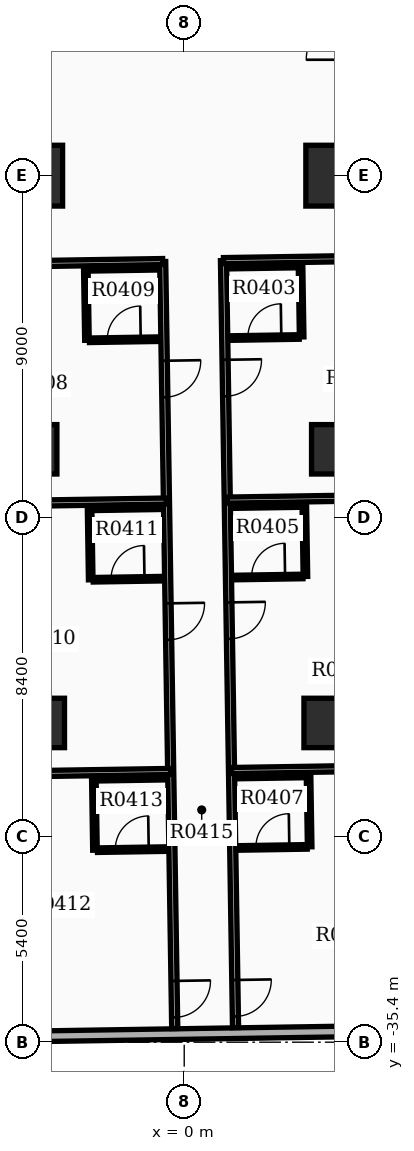
"""IFC4 building model, lengths in metres.
Left out: names, types, materials, properties, quantities, classifications, styles, units other than length and angle.
Written with IfcOpenShell. Run it as: python <this file> out.ifc"""

import sys

from ifc_helpers import new_model, si_unit, direction, frame, frame_2d, origin, origin_2d, place, context, subcontext, project, spatial, rectangle, extrude, element, fill, save


model = new_model("IFC4")
c1 = context("Model", 3, precision=1e-05, world=origin(), true_north=direction((0.0, 1.0)))
c2 = subcontext(c1, "Body", "Model", "MODEL_VIEW")
j1 = project(units=[si_unit("LENGTHUNIT", "METRE"), si_unit("PLANEANGLEUNIT", "RADIAN")], contexts=[c1])
p1 = place(None, origin())
s1 = spatial("IfcSite", under=j1, at=p1, CompositionType="ELEMENT")
p2 = place(p1, origin())
s2 = spatial("IfcBuilding", under=s1, at=p2, CompositionType="ELEMENT")
p3 = place(p2, frame((0.0, 0.0, 27.6)))
s3 = spatial("IfcBuildingStorey", under=s2, at=p3, CompositionType="ELEMENT", Elevation=27.6)
for number, where, z_axis, x_axis in (
    (1, (-4.0, -12.6, 0.0), (0.0, 0.0, 1.0), (1.0, 0.0, 0.0)),
    (2, (4.0, -12.6, 0.0), (0.0, 0.0, 1.0), (1.0, 0.0, 0.0)),
):
    element("IfcColumn", number, at=place(p3, frame(where, z_axis=z_axis, x_axis=x_axis)), inside=s3, PredefinedType="COLUMN", context=c2, shape_type="SweptSolid", body=[
        extrude(rectangle(XDim=1.6, YDim=1.6, at=origin_2d()), origin(), (0.0, 0.0, 1.0), 3.9),
    ])
for number, where, z_axis, x_axis in (
    (3, (-4.0, -19.8, 0.0), (0.0, 0.0, 1.0), (1.0, 0.0, 0.0)),
    (4, (4.0, -19.8, 0.0), (0.0, 0.0, 1.0), (1.0, 0.0, 0.0)),
    (5, (-3.8, -27.0, 0.0), (0.0, 0.0, 1.0), (1.0, 0.0, 0.0)),
    (6, (3.8, -27.0, 0.0), (0.0, 0.0, 1.0), (1.0, 0.0, 0.0)),
):
    element("IfcColumn", number, at=place(p3, frame(where, z_axis=z_axis, x_axis=x_axis)), inside=s3, PredefinedType="COLUMN", context=c2, shape_type="SweptSolid", body=[
        extrude(rectangle(XDim=1.3, YDim=1.3, at=origin_2d()), origin(), (0.0, 0.0, 1.0), 3.9),
    ])
p4 = place(p3, frame((-6.307, -35.283, 0.0), z_axis=(0.0, 0.0, 1.0), x_axis=(0.999876549481, 0.015712599986, 0.0)))
e7 = element("IfcWall", 7, at=p4, inside=s3, PredefinedType="STANDARD", context=c2, shape_type="SweptSolid", body=[
    extrude(rectangle(XDim=13.72, YDim=0.28, at=frame_2d((6.86, 0.0))), origin(), (0.0, 0.0, 1.0), 2.91),
])
p5 = place(p4, frame((0.85, 0.0, 0.85)))
e8 = element("IfcOpeningElement", 8, at=p5, cuts=e7, PredefinedType="OPENING", context=c2, shape_type="SweptSolid", body=[
    extrude(rectangle(XDim=1.0, YDim=1.5, at=frame_2d((0.5, 0.75))), frame((0.0, 0.15, 0.0), z_axis=(0.0, -1.0, 0.0), x_axis=(1.0, 0.0, 0.0)), (0.0, 0.0, 1.0), 0.3),
])
p6 = place(p3, frame((1.033, -14.836, 0.0), z_axis=(0.0, 0.0, 1.0), x_axis=(0.015701893165, -0.999876717676, 0.0)))
e9 = element("IfcWall", 9, at=p6, inside=s3, PredefinedType="PARTITIONING", context=c2, shape_type="SweptSolid", body=[
    extrude(rectangle(XDim=20.182, YDim=0.16, at=frame_2d((10.091, 0.0))), origin(), (0.0, 0.0, 1.0), 2.9),
])
p7 = place(p6, frame((2.61, 0.0, 0.0)))
e10 = element("IfcOpeningElement", 10, at=p7, cuts=e9, PredefinedType="OPENING", context=c2, shape_type="SweptSolid", body=[
    extrude(rectangle(XDim=0.96, YDim=2.15, at=frame_2d((0.48, 1.075))), frame((0.0, 0.09, 0.0), z_axis=(0.0, -1.0, 0.0), x_axis=(1.0, 0.0, 0.0)), (0.0, 0.0, 1.0), 0.18),
])
p8 = place(p6, frame((8.994, 0.0, 0.0)))
e11 = element("IfcOpeningElement", 11, at=p8, cuts=e9, PredefinedType="OPENING", context=c2, shape_type="SweptSolid", body=[
    extrude(rectangle(XDim=0.96, YDim=2.15, at=frame_2d((0.48, 1.075))), frame((0.0, 0.09, 0.0), z_axis=(0.0, -1.0, 0.0), x_axis=(1.0, 0.0, 0.0)), (0.0, 0.0, 1.0), 0.18),
])
p9 = place(p6, frame((18.93, 0.0, 0.0)))
e12 = element("IfcOpeningElement", 12, at=p9, cuts=e9, PredefinedType="OPENING", context=c2, shape_type="SweptSolid", body=[
    extrude(rectangle(XDim=0.96, YDim=2.15, at=frame_2d((0.48, 1.075))), frame((0.0, 0.09, 0.0), z_axis=(0.0, -1.0, 0.0), x_axis=(1.0, 0.0, 0.0)), (0.0, 0.0, 1.0), 0.18),
])
p10 = place(p3, frame((1.033, -14.836, 0.0), z_axis=(0.0, 0.0, 1.0), x_axis=(0.999876548847, 0.015712640343, 0.0)))
e13 = element("IfcWall", 13, at=p10, inside=s3, PredefinedType="PARTITIONING", context=c2, shape_type="SweptSolid", body=[
    extrude(rectangle(XDim=5.92, YDim=0.16, at=frame_2d((2.96, 0.0))), origin(), (0.0, 0.0, 1.0), 2.9),
])
p11 = place(p3, frame((1.132, -21.137, 0.0), z_axis=(0.0, 0.0, 1.0), x_axis=(0.999876865599, 0.015692470796, 0.0)))
e14 = element("IfcWall", 14, at=p11, inside=s3, PredefinedType="PARTITIONING", context=c2, shape_type="SweptSolid", body=[
    extrude(rectangle(XDim=5.772, YDim=0.16, at=frame_2d((2.886, 0.0))), origin(), (0.0, 0.0, 1.0), 2.9),
])
p12 = place(p3, frame((1.205, -16.873, 0.0), z_axis=(0.0, 0.0, 1.0), x_axis=(0.999874722342, 0.015828443418, 0.0)))
e15 = element("IfcWall", 15, at=p12, inside=s3, PredefinedType="PARTITIONING", context=c2, shape_type="SweptSolid", body=[
    extrude(rectangle(XDim=1.82, YDim=0.12, at=frame_2d((0.91, 0.0))), origin(), (0.0, 0.0, 1.0), 2.9),
])
p13 = place(p12, frame((0.47, 0.0, 0.0)))
e16 = element("IfcOpeningElement", 16, at=p13, cuts=e15, PredefinedType="OPENING", context=c2, shape_type="SweptSolid", body=[
    extrude(rectangle(XDim=0.88, YDim=2.1, at=frame_2d((0.44, 1.05))), frame((0.0, 0.07, 0.0), z_axis=(0.0, -1.0, 0.0), x_axis=(1.0, 0.0, 0.0)), (0.0, 0.0, 1.0), 0.14),
])
p14 = place(p3, frame((1.176, -14.993, 0.0), z_axis=(0.0, 0.0, 1.0), x_axis=(0.999876803258, 0.015696442504, 0.0)))
e17 = element("IfcWall", 17, at=p14, inside=s3, PredefinedType="PARTITIONING", context=c2, shape_type="SweptSolid", body=[
    extrude(rectangle(XDim=1.82, YDim=0.12, at=frame_2d((0.91, 0.0))), origin(), (0.0, 0.0, 1.0), 2.9),
])
p15 = place(p3, frame((3.06, -14.964, 0.0), z_axis=(0.0, 0.0, 1.0), x_axis=(0.015714386166, -0.99987652141, 0.0)))
e18 = element("IfcWall", 18, at=p15, inside=s3, PredefinedType="PARTITIONING", context=c2, shape_type="SweptSolid", body=[
    extrude(rectangle(XDim=1.88, YDim=0.12, at=frame_2d((0.94, 0.0))), origin(), (0.0, 0.0, 1.0), 2.9),
])
p16 = place(p3, frame((1.244, -28.252, 0.0), z_axis=(0.0, 0.0, 1.0), x_axis=(0.999876865599, 0.015692470796, 0.0)))
e19 = element("IfcWall", 19, at=p16, inside=s3, PredefinedType="PARTITIONING", context=c2, shape_type="SweptSolid", body=[
    extrude(rectangle(XDim=5.772, YDim=0.16, at=frame_2d((2.886, 0.0))), origin(), (0.0, 0.0, 1.0), 2.9),
])
p17 = place(p3, frame((1.304, -23.174, 0.0), z_axis=(0.0, 0.0, 1.0), x_axis=(0.999876803258, 0.015696442504, 0.0)))
e20 = element("IfcWall", 20, at=p17, inside=s3, PredefinedType="PARTITIONING", context=c2, shape_type="SweptSolid", body=[
    extrude(rectangle(XDim=1.82, YDim=0.12, at=frame_2d((0.91, 0.0))), origin(), (0.0, 0.0, 1.0), 2.9),
])
p18 = place(p17, frame((0.47, 0.0, 0.0)))
e21 = element("IfcOpeningElement", 21, at=p18, cuts=e20, PredefinedType="OPENING", context=c2, shape_type="SweptSolid", body=[
    extrude(rectangle(XDim=0.88, YDim=2.1, at=frame_2d((0.44, 1.05))), frame((0.0, 0.07, 0.0), z_axis=(0.0, -1.0, 0.0), x_axis=(1.0, 0.0, 0.0)), (0.0, 0.0, 1.0), 0.14),
])
p19 = place(p3, frame((1.275, -21.295, 0.0), z_axis=(0.0, 0.0, 1.0), x_axis=(0.999876836305, 0.015694337248, 0.0)))
e22 = element("IfcWall", 22, at=p19, inside=s3, PredefinedType="PARTITIONING", context=c2, shape_type="SweptSolid", body=[
    extrude(rectangle(XDim=1.82, YDim=0.12, at=frame_2d((0.91, 0.0))), origin(), (0.0, 0.0, 1.0), 2.9),
])
p20 = place(p3, frame((3.159, -21.265, 0.0), z_axis=(0.0, 0.0, 1.0), x_axis=(0.01571234584, -0.999876553475, 0.0)))
e23 = element("IfcWall", 23, at=p20, inside=s3, PredefinedType="PARTITIONING", context=c2, shape_type="SweptSolid", body=[
    extrude(rectangle(XDim=1.88, YDim=0.12, at=frame_2d((0.94, 0.0))), origin(), (0.0, 0.0, 1.0), 2.9),
])
p21 = place(p3, frame((1.416, -30.29, 0.0), z_axis=(0.0, 0.0, 1.0), x_axis=(0.999876803258, 0.015696442504, 0.0)))
e24 = element("IfcWall", 24, at=p21, inside=s3, PredefinedType="PARTITIONING", context=c2, shape_type="SweptSolid", body=[
    extrude(rectangle(XDim=1.82, YDim=0.12, at=frame_2d((0.91, 0.0))), origin(), (0.0, 0.0, 1.0), 2.9),
])
p22 = place(p21, frame((0.47, 0.0, 0.0)))
e25 = element("IfcOpeningElement", 25, at=p22, cuts=e24, PredefinedType="OPENING", context=c2, shape_type="SweptSolid", body=[
    extrude(rectangle(XDim=0.88, YDim=2.1, at=frame_2d((0.44, 1.05))), frame((0.0, 0.07, 0.0), z_axis=(0.0, -1.0, 0.0), x_axis=(1.0, 0.0, 0.0)), (0.0, 0.0, 1.0), 0.14),
])
p23 = place(p3, frame((1.386, -28.41, 0.0), z_axis=(0.0, 0.0, 1.0), x_axis=(0.999876836305, 0.015694337248, 0.0)))
e26 = element("IfcWall", 26, at=p23, inside=s3, PredefinedType="PARTITIONING", context=c2, shape_type="SweptSolid", body=[
    extrude(rectangle(XDim=1.82, YDim=0.12, at=frame_2d((0.91, 0.0))), origin(), (0.0, 0.0, 1.0), 2.9),
])
p24 = place(p3, frame((3.271, -28.38, 0.0), z_axis=(0.0, 0.0, 1.0), x_axis=(0.01571234584, -0.999876553475, 0.0)))
e27 = element("IfcWall", 27, at=p24, inside=s3, PredefinedType="PARTITIONING", context=c2, shape_type="SweptSolid", body=[
    extrude(rectangle(XDim=1.88, YDim=0.12, at=frame_2d((0.94, 0.0))), origin(), (0.0, 0.0, 1.0), 2.9),
])
p25 = place(p3, frame((-0.567, -14.861, 0.0), z_axis=(0.0, 0.0, 1.0), x_axis=(0.015713797103, -0.999876530668, 0.0)))
e28 = element("IfcWall", 28, at=p25, inside=s3, PredefinedType="PARTITIONING", context=c2, shape_type="SweptSolid", body=[
    extrude(rectangle(XDim=20.182, YDim=0.16, at=frame_2d((10.091, 0.0))), origin(), (0.0, 0.0, 1.0), 2.9),
])
p26 = place(p25, frame((2.61, 0.0, 0.0)))
e29 = element("IfcOpeningElement", 29, at=p26, cuts=e28, PredefinedType="OPENING", context=c2, shape_type="SweptSolid", body=[
    extrude(rectangle(XDim=0.96, YDim=2.15, at=frame_2d((0.48, 1.075))), frame((0.0, 0.09, 0.0), z_axis=(0.0, -1.0, 0.0), x_axis=(1.0, 0.0, 0.0)), (0.0, 0.0, 1.0), 0.18),
])
p27 = place(p25, frame((8.994, 0.0, 0.0)))
e30 = element("IfcOpeningElement", 30, at=p27, cuts=e28, PredefinedType="OPENING", context=c2, shape_type="SweptSolid", body=[
    extrude(rectangle(XDim=0.96, YDim=2.15, at=frame_2d((0.48, 1.075))), frame((0.0, 0.09, 0.0), z_axis=(0.0, -1.0, 0.0), x_axis=(1.0, 0.0, 0.0)), (0.0, 0.0, 1.0), 0.18),
])
p28 = place(p25, frame((18.93, 0.0, 0.0)))
e31 = element("IfcOpeningElement", 31, at=p28, cuts=e28, PredefinedType="OPENING", context=c2, shape_type="SweptSolid", body=[
    extrude(rectangle(XDim=0.96, YDim=2.15, at=frame_2d((0.48, 1.075))), frame((0.0, 0.09, 0.0), z_axis=(0.0, -1.0, 0.0), x_axis=(1.0, 0.0, 0.0)), (0.0, 0.0, 1.0), 0.18),
])
p29 = place(p3, frame((-0.567, -14.861, 0.0), z_axis=(0.0, 0.0, 1.0), x_axis=(-0.999876548847, -0.015712640343, 0.0)))
e32 = element("IfcWall", 32, at=p29, inside=s3, PredefinedType="PARTITIONING", context=c2, shape_type="SweptSolid", body=[
    extrude(rectangle(XDim=5.92, YDim=0.16, at=frame_2d((2.96, 0.0))), origin(), (0.0, 0.0, 1.0), 2.9),
])
p30 = place(p3, frame((-0.468, -21.162, 0.0), z_axis=(0.0, 0.0, 1.0), x_axis=(-0.999876865599, -0.015692470796, 0.0)))
e33 = element("IfcWall", 33, at=p30, inside=s3, PredefinedType="PARTITIONING", context=c2, shape_type="SweptSolid", body=[
    extrude(rectangle(XDim=5.772, YDim=0.16, at=frame_2d((2.886, 0.0))), origin(), (0.0, 0.0, 1.0), 2.9),
])
p31 = place(p3, frame((-2.494, -16.931, 0.0), z_axis=(0.0, 0.0, 1.0), x_axis=(0.999874722342, 0.015828443418, 0.0)))
e34 = element("IfcWall", 34, at=p31, inside=s3, PredefinedType="PARTITIONING", context=c2, shape_type="SweptSolid", body=[
    extrude(rectangle(XDim=1.82, YDim=0.12, at=frame_2d((0.91, 0.0))), origin(), (0.0, 0.0, 1.0), 2.9),
])
p32 = place(p31, frame((0.47, 0.0, 0.0)))
e35 = element("IfcOpeningElement", 35, at=p32, cuts=e34, PredefinedType="OPENING", context=c2, shape_type="SweptSolid", body=[
    extrude(rectangle(XDim=0.88, YDim=2.1, at=frame_2d((0.44, 1.05))), frame((0.0, 0.07, 0.0), z_axis=(0.0, -1.0, 0.0), x_axis=(1.0, 0.0, 0.0)), (0.0, 0.0, 1.0), 0.14),
])
p33 = place(p3, frame((-2.524, -15.052, 0.0), z_axis=(0.0, 0.0, 1.0), x_axis=(0.999876836305, 0.015694337248, 0.0)))
e36 = element("IfcWall", 36, at=p33, inside=s3, PredefinedType="PARTITIONING", context=c2, shape_type="SweptSolid", body=[
    extrude(rectangle(XDim=1.82, YDim=0.12, at=frame_2d((0.91, 0.0))), origin(), (0.0, 0.0, 1.0), 2.9),
])
p34 = place(p3, frame((-2.589, -15.052, 0.0), z_axis=(0.0, 0.0, 1.0), x_axis=(0.01571234584, -0.999876553475, 0.0)))
e37 = element("IfcWall", 37, at=p34, inside=s3, PredefinedType="PARTITIONING", context=c2, shape_type="SweptSolid", body=[
    extrude(rectangle(XDim=1.88, YDim=0.12, at=frame_2d((0.94, 0.0))), origin(), (0.0, 0.0, 1.0), 2.9),
])
p35 = place(p3, frame((-0.356, -28.277, 0.0), z_axis=(0.0, 0.0, 1.0), x_axis=(-0.999876201031, -0.015734758102, 0.0)))
e38 = element("IfcWall", 38, at=p35, inside=s3, PredefinedType="PARTITIONING", context=c2, shape_type="SweptSolid", body=[
    extrude(rectangle(XDim=5.772, YDim=0.16, at=frame_2d((2.886, 0.0))), origin(), (0.0, 0.0, 1.0), 2.9),
])
p36 = place(p3, frame((-2.396, -23.232, 0.0), z_axis=(0.0, 0.0, 1.0), x_axis=(0.999876836305, 0.015694337248, 0.0)))
e39 = element("IfcWall", 39, at=p36, inside=s3, PredefinedType="PARTITIONING", context=c2, shape_type="SweptSolid", body=[
    extrude(rectangle(XDim=1.82, YDim=0.12, at=frame_2d((0.91, 0.0))), origin(), (0.0, 0.0, 1.0), 2.9),
])
p37 = place(p36, frame((0.47, 0.0, 0.0)))
e40 = element("IfcOpeningElement", 40, at=p37, cuts=e39, PredefinedType="OPENING", context=c2, shape_type="SweptSolid", body=[
    extrude(rectangle(XDim=0.88, YDim=2.1, at=frame_2d((0.44, 1.05))), frame((0.0, 0.07, 0.0), z_axis=(0.0, -1.0, 0.0), x_axis=(1.0, 0.0, 0.0)), (0.0, 0.0, 1.0), 0.14),
])
p38 = place(p3, frame((-2.425, -21.353, 0.0), z_axis=(0.0, 0.0, 1.0), x_axis=(0.999876836305, 0.015694337248, 0.0)))
e41 = element("IfcWall", 41, at=p38, inside=s3, PredefinedType="PARTITIONING", context=c2, shape_type="SweptSolid", body=[
    extrude(rectangle(XDim=1.82, YDim=0.12, at=frame_2d((0.91, 0.0))), origin(), (0.0, 0.0, 1.0), 2.9),
])
p39 = place(p3, frame((-2.49, -21.354, 0.0), z_axis=(0.0, 0.0, 1.0), x_axis=(0.015714386166, -0.99987652141, 0.0)))
e42 = element("IfcWall", 42, at=p39, inside=s3, PredefinedType="PARTITIONING", context=c2, shape_type="SweptSolid", body=[
    extrude(rectangle(XDim=1.88, YDim=0.12, at=frame_2d((0.94, 0.0))), origin(), (0.0, 0.0, 1.0), 2.9),
])
p40 = place(p3, frame((-2.284, -30.348, 0.0), z_axis=(0.0, 0.0, 1.0), x_axis=(0.999876836305, 0.015694337248, 0.0)))
e43 = element("IfcWall", 43, at=p40, inside=s3, PredefinedType="PARTITIONING", context=c2, shape_type="SweptSolid", body=[
    extrude(rectangle(XDim=1.82, YDim=0.12, at=frame_2d((0.91, 0.0))), origin(), (0.0, 0.0, 1.0), 2.9),
])
p41 = place(p40, frame((0.47, 0.0, 0.0)))
e44 = element("IfcOpeningElement", 44, at=p41, cuts=e43, PredefinedType="OPENING", context=c2, shape_type="SweptSolid", body=[
    extrude(rectangle(XDim=0.88, YDim=2.1, at=frame_2d((0.44, 1.05))), frame((0.0, 0.07, 0.0), z_axis=(0.0, -1.0, 0.0), x_axis=(1.0, 0.0, 0.0)), (0.0, 0.0, 1.0), 0.14),
])
p42 = place(p3, frame((-2.313, -28.468, 0.0), z_axis=(0.0, 0.0, 1.0), x_axis=(0.999876803258, 0.015696442504, 0.0)))
e45 = element("IfcWall", 45, at=p42, inside=s3, PredefinedType="PARTITIONING", context=c2, shape_type="SweptSolid", body=[
    extrude(rectangle(XDim=1.82, YDim=0.12, at=frame_2d((0.91, 0.0))), origin(), (0.0, 0.0, 1.0), 2.9),
])
p43 = place(p3, frame((-2.378, -28.469, 0.0), z_axis=(0.0, 0.0, 1.0), x_axis=(0.015714386166, -0.99987652141, 0.0)))
e46 = element("IfcWall", 46, at=p43, inside=s3, PredefinedType="PARTITIONING", context=c2, shape_type="SweptSolid", body=[
    extrude(rectangle(XDim=1.88, YDim=0.12, at=frame_2d((0.94, 0.0))), origin(), (0.0, 0.0, 1.0), 2.9),
])
p44 = place(p7, origin())
e47 = element("IfcDoor", 47, at=p44, inside=s3, OperationType="SINGLE_SWING_LEFT", PredefinedType="DOOR", context=c2, shape_type="SweptSolid", body=[
    extrude(rectangle(XDim=0.96, YDim=2.15, at=frame_2d((0.48, 1.075))), frame((0.0, 0.025, 0.0), z_axis=(0.0, -1.0, 0.0), x_axis=(1.0, 0.0, 0.0)), (0.0, 0.0, 1.0), 0.05),
])
fill(e10, e47)
p45 = place(p13, origin())
e48 = element("IfcDoor", 48, at=p45, inside=s3, OperationType="SINGLE_SWING_RIGHT", PredefinedType="DOOR", context=c2, shape_type="SweptSolid", body=[
    extrude(rectangle(XDim=0.88, YDim=2.1, at=frame_2d((0.44, 1.05))), frame((0.0, 0.025, 0.0), z_axis=(0.0, -1.0, 0.0), x_axis=(1.0, 0.0, 0.0)), (0.0, 0.0, 1.0), 0.05),
])
fill(e16, e48)
p46 = place(p8, origin())
e49 = element("IfcDoor", 49, at=p46, inside=s3, OperationType="SINGLE_SWING_LEFT", PredefinedType="DOOR", context=c2, shape_type="SweptSolid", body=[
    extrude(rectangle(XDim=0.96, YDim=2.15, at=frame_2d((0.48, 1.075))), frame((0.0, 0.025, 0.0), z_axis=(0.0, -1.0, 0.0), x_axis=(1.0, 0.0, 0.0)), (0.0, 0.0, 1.0), 0.05),
])
fill(e11, e49)
p47 = place(p18, origin())
e50 = element("IfcDoor", 50, at=p47, inside=s3, OperationType="SINGLE_SWING_RIGHT", PredefinedType="DOOR", context=c2, shape_type="SweptSolid", body=[
    extrude(rectangle(XDim=0.88, YDim=2.1, at=frame_2d((0.44, 1.05))), frame((0.0, 0.025, 0.0), z_axis=(0.0, -1.0, 0.0), x_axis=(1.0, 0.0, 0.0)), (0.0, 0.0, 1.0), 0.05),
])
fill(e21, e50)
p48 = place(p9, origin())
e51 = element("IfcDoor", 51, at=p48, inside=s3, OperationType="SINGLE_SWING_LEFT", PredefinedType="DOOR", context=c2, shape_type="SweptSolid", body=[
    extrude(rectangle(XDim=0.96, YDim=2.15, at=frame_2d((0.48, 1.075))), frame((0.0, 0.025, 0.0), z_axis=(0.0, -1.0, 0.0), x_axis=(1.0, 0.0, 0.0)), (0.0, 0.0, 1.0), 0.05),
])
fill(e12, e51)
p49 = place(p22, origin())
e52 = element("IfcDoor", 52, at=p49, inside=s3, OperationType="SINGLE_SWING_RIGHT", PredefinedType="DOOR", context=c2, shape_type="SweptSolid", body=[
    extrude(rectangle(XDim=0.88, YDim=2.1, at=frame_2d((0.44, 1.05))), frame((0.0, 0.025, 0.0), z_axis=(0.0, -1.0, 0.0), x_axis=(1.0, 0.0, 0.0)), (0.0, 0.0, 1.0), 0.05),
])
fill(e25, e52)
p50 = place(p26, origin())
e53 = element("IfcDoor", 53, at=p50, inside=s3, OperationType="SINGLE_SWING_LEFT", PredefinedType="DOOR", context=c2, shape_type="SweptSolid", body=[
    extrude(rectangle(XDim=0.96, YDim=2.15, at=frame_2d((0.48, 1.075))), frame((0.0, 0.025, 0.0), z_axis=(0.0, -1.0, 0.0), x_axis=(1.0, 0.0, 0.0)), (0.0, 0.0, 1.0), 0.05),
])
fill(e29, e53)
p51 = place(p32, origin())
e54 = element("IfcDoor", 54, at=p51, inside=s3, OperationType="SINGLE_SWING_RIGHT", PredefinedType="DOOR", context=c2, shape_type="SweptSolid", body=[
    extrude(rectangle(XDim=0.88, YDim=2.1, at=frame_2d((0.44, 1.05))), frame((0.0, 0.025, 0.0), z_axis=(0.0, -1.0, 0.0), x_axis=(1.0, 0.0, 0.0)), (0.0, 0.0, 1.0), 0.05),
])
fill(e35, e54)
p52 = place(p27, origin())
e55 = element("IfcDoor", 55, at=p52, inside=s3, OperationType="SINGLE_SWING_LEFT", PredefinedType="DOOR", context=c2, shape_type="SweptSolid", body=[
    extrude(rectangle(XDim=0.96, YDim=2.15, at=frame_2d((0.48, 1.075))), frame((0.0, 0.025, 0.0), z_axis=(0.0, -1.0, 0.0), x_axis=(1.0, 0.0, 0.0)), (0.0, 0.0, 1.0), 0.05),
])
fill(e30, e55)
p53 = place(p37, origin())
e56 = element("IfcDoor", 56, at=p53, inside=s3, OperationType="SINGLE_SWING_RIGHT", PredefinedType="DOOR", context=c2, shape_type="SweptSolid", body=[
    extrude(rectangle(XDim=0.88, YDim=2.1, at=frame_2d((0.44, 1.05))), frame((0.0, 0.025, 0.0), z_axis=(0.0, -1.0, 0.0), x_axis=(1.0, 0.0, 0.0)), (0.0, 0.0, 1.0), 0.05),
])
fill(e40, e56)
p54 = place(p28, origin())
e57 = element("IfcDoor", 57, at=p54, inside=s3, OperationType="SINGLE_SWING_LEFT", PredefinedType="DOOR", context=c2, shape_type="SweptSolid", body=[
    extrude(rectangle(XDim=0.96, YDim=2.15, at=frame_2d((0.48, 1.075))), frame((0.0, 0.025, 0.0), z_axis=(0.0, -1.0, 0.0), x_axis=(1.0, 0.0, 0.0)), (0.0, 0.0, 1.0), 0.05),
])
fill(e31, e57)
p55 = place(p41, origin())
e58 = element("IfcDoor", 58, at=p55, inside=s3, OperationType="SINGLE_SWING_RIGHT", PredefinedType="DOOR", context=c2, shape_type="SweptSolid", body=[
    extrude(rectangle(XDim=0.88, YDim=2.1, at=frame_2d((0.44, 1.05))), frame((0.0, 0.025, 0.0), z_axis=(0.0, -1.0, 0.0), x_axis=(1.0, 0.0, 0.0)), (0.0, 0.0, 1.0), 0.05),
])
fill(e44, e58)
save(model, sys.argv[1])
